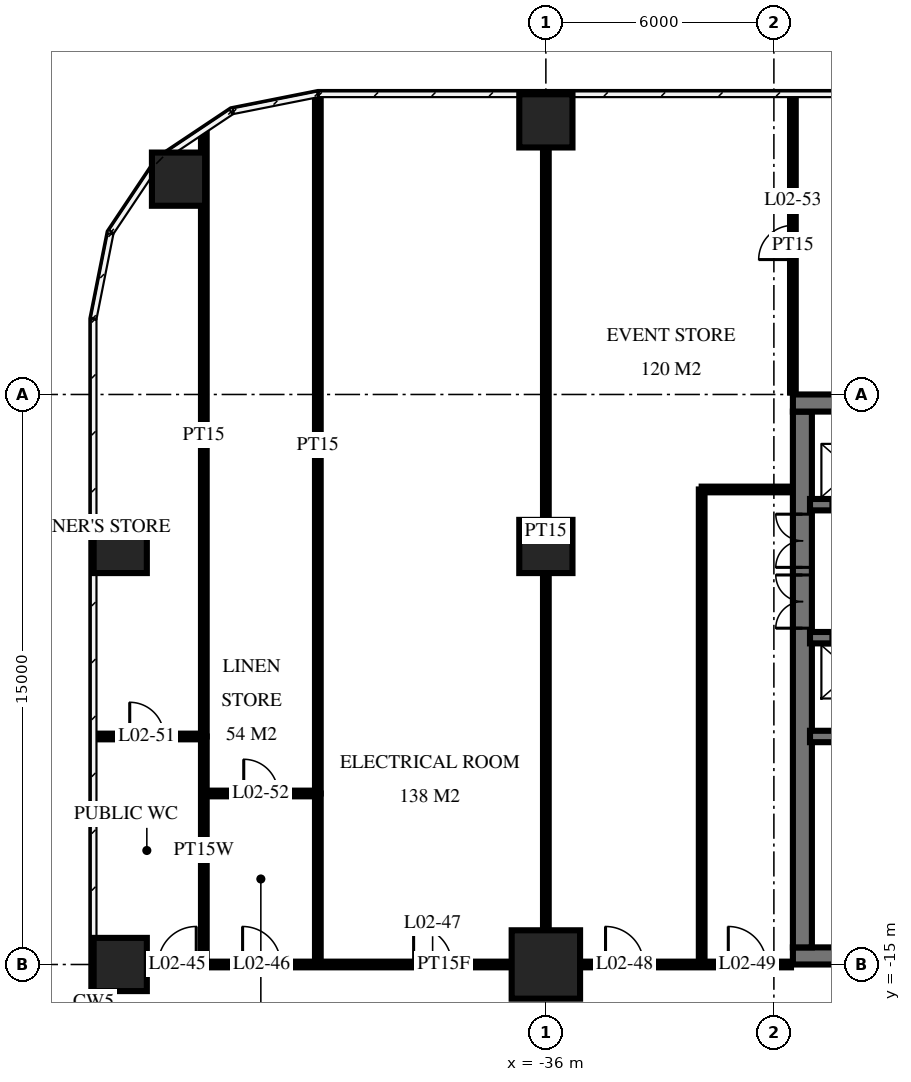
"""IFC4 building model, lengths in metres.
Left out: names, types, materials, properties, quantities, classifications, styles, units other than length and angle.
Written with IfcOpenShell. Run it as: python <this file> out.ifc"""

import sys

from ifc_helpers import new_model, si_unit, direction, frame, frame_2d, origin, origin_2d, place, context, subcontext, project, spatial, rectangle, circle, extrude, element, fill, save


model = new_model("IFC4")
c1 = context("Model", 3, precision=1e-05, world=origin(), true_north=direction((0.0, 1.0)))
c2 = subcontext(c1, "Body", "Model", "MODEL_VIEW")
j1 = project(units=[si_unit("LENGTHUNIT", "METRE"), si_unit("PLANEANGLEUNIT", "RADIAN")], contexts=[c1])
p1 = place(None, origin())
s1 = spatial("IfcSite", under=j1, at=p1, CompositionType="ELEMENT")
p2 = place(p1, origin())
s2 = spatial("IfcBuilding", under=s1, at=p2, CompositionType="ELEMENT")
p3 = place(p2, frame((0.0, 0.0, 12.5)))
s3 = spatial("IfcBuildingStorey", under=s2, at=p3, CompositionType="ELEMENT", Elevation=12.5)
for number, where, z_axis, x_axis in (
    (1, (-47.2, -15.0, 0.0), (0.0, 0.0, 1.0), (1.0, 0.0, 0.0)),
    (2, (-47.2, -4.0, 0.0), (0.0, 0.0, 1.0), (1.0, 0.0, 0.0)),
    (3, (-45.666, 5.666, 0.0), (0.0, 0.0, 1.0), (1.0, 0.0, 0.0)),
):
    element("IfcColumn", number, at=place(p3, frame(where, z_axis=z_axis, x_axis=x_axis)), inside=s3, PredefinedType="COLUMN", context=c2, shape_type="SweptSolid", body=[
        extrude(circle(Radius=0.7, at=origin_2d()), origin(), (0.0, 0.0, 1.0), 5.5),
    ])
p4 = place(p3, frame((-36.0, -15.0, 0.0), z_axis=(0.0, 0.0, 1.0), x_axis=(1.0, 0.0, 0.0)))
e4 = element("IfcColumn", 4, at=p4, inside=s3, PredefinedType="COLUMN", context=c2, shape_type="SweptSolid", body=[
    extrude(circle(Radius=0.9, at=origin_2d()), origin(), (0.0, 0.0, 1.0), 5.5),
])
for number, where, z_axis, x_axis in (
    (5, (-36.0, -4.0, 0.0), (0.0, 0.0, 1.0), (1.0, 0.0, 0.0)),
    (6, (-36.0, 7.2, 0.0), (0.0, 0.0, 1.0), (1.0, 0.0, 0.0)),
):
    element("IfcColumn", number, at=place(p3, frame(where, z_axis=z_axis, x_axis=x_axis)), inside=s3, PredefinedType="COLUMN", context=c2, shape_type="SweptSolid", body=[
        extrude(circle(Radius=0.7, at=origin_2d()), origin(), (0.0, 0.0, 1.0), 5.5),
    ])
p5 = place(p3, frame((-29.5, -0.225, 0.0), z_axis=(0.0, 0.0, 1.0), x_axis=(1.0, 0.0, 0.0)))
e7 = element("IfcWall", 7, at=p5, inside=s3, PredefinedType="SHEAR", context=c2, shape_type="SweptSolid", body=[
    extrude(rectangle(XDim=19.5, YDim=0.45, at=frame_2d((9.75, 0.0))), origin(), (0.0, 0.0, 1.0), 5.5),
])
p6 = place(p3, frame((-29.5, -14.775, 0.0), z_axis=(0.0, 0.0, 1.0), x_axis=(1.0, 0.0, 0.0)))
e8 = element("IfcWall", 8, at=p6, inside=s3, PredefinedType="SHEAR", context=c2, shape_type="SweptSolid", body=[
    extrude(rectangle(XDim=19.5, YDim=0.45, at=frame_2d((9.75, 0.0))), origin(), (0.0, 0.0, 1.0), 5.5),
])
p7 = place(p6, frame((11.2, 0.0, 0.0)))
e9 = element("IfcOpeningElement", 9, at=p7, cuts=e8, PredefinedType="OPENING", context=c2, shape_type="SweptSolid", body=[
    extrude(rectangle(XDim=1.2, YDim=2.1, at=frame_2d((0.6, 1.05))), frame((0.0, 0.235, 0.0), z_axis=(0.0, -1.0, 0.0), x_axis=(1.0, 0.0, 0.0)), (0.0, 0.0, 1.0), 0.47),
])
p8 = place(p6, frame((14.25, 0.0, 0.0)))
e10 = element("IfcOpeningElement", 10, at=p8, cuts=e8, PredefinedType="OPENING", context=c2, shape_type="SweptSolid", body=[
    extrude(rectangle(XDim=1.1, YDim=2.1, at=frame_2d((0.55, 1.05))), frame((0.0, 0.235, 0.0), z_axis=(0.0, -1.0, 0.0), x_axis=(1.0, 0.0, 0.0)), (0.0, 0.0, 1.0), 0.47),
])
p9 = place(p6, frame((8.5, 0.0, 0.0)))
e11 = element("IfcOpeningElement", 11, at=p9, cuts=e8, PredefinedType="OPENING", context=c2, shape_type="SweptSolid", body=[
    extrude(rectangle(XDim=0.9, YDim=2.1, at=frame_2d((0.45, 1.05))), frame((0.0, 0.235, 0.0), z_axis=(0.0, -1.0, 0.0), x_axis=(1.0, 0.0, 0.0)), (0.0, 0.0, 1.0), 0.47),
])
p10 = place(p6, frame((6.05, 0.0, 0.0)))
e12 = element("IfcOpeningElement", 12, at=p10, cuts=e8, PredefinedType="OPENING", context=c2, shape_type="SweptSolid", body=[
    extrude(rectangle(XDim=1.0, YDim=2.1, at=frame_2d((0.5, 1.05))), frame((0.0, 0.235, 0.0), z_axis=(0.0, -1.0, 0.0), x_axis=(1.0, 0.0, 0.0)), (0.0, 0.0, 1.0), 0.47),
])
p11 = place(p6, frame((3.413, 0.0, 0.0)))
e13 = element("IfcOpeningElement", 13, at=p11, cuts=e8, PredefinedType="OPENING", context=c2, shape_type="SweptSolid", body=[
    extrude(rectangle(XDim=1.0, YDim=2.1, at=frame_2d((0.5, 1.05))), frame((0.0, 0.235, 0.0), z_axis=(0.0, -1.0, 0.0), x_axis=(1.0, 0.0, 0.0)), (0.0, 0.0, 1.0), 0.47),
])
p12 = place(p6, frame((1.087, 0.0, 0.0)))
e14 = element("IfcOpeningElement", 14, at=p12, cuts=e8, PredefinedType="OPENING", context=c2, shape_type="SweptSolid", body=[
    extrude(rectangle(XDim=1.0, YDim=2.1, at=frame_2d((0.5, 1.05))), frame((0.0, 0.235, 0.0), z_axis=(0.0, -1.0, 0.0), x_axis=(1.0, 0.0, 0.0)), (0.0, 0.0, 1.0), 0.47),
])
p13 = place(p3, frame((-29.25, -14.55, 0.0), z_axis=(0.0, 0.0, 1.0), x_axis=(0.0, 1.0, 0.0)))
e15 = element("IfcWall", 15, at=p13, inside=s3, PredefinedType="SHEAR", context=c2, shape_type="SweptSolid", body=[
    extrude(rectangle(XDim=14.1, YDim=0.5, at=frame_2d((7.05, 0.0))), origin(), (0.0, 0.0, 1.0), 5.5),
])
p14 = place(p13, frame((8.4, 0.0, 0.0)))
e16 = element("IfcOpeningElement", 16, at=p14, cuts=e15, PredefinedType="OPENING", context=c2, shape_type="SweptSolid", body=[
    extrude(rectangle(XDim=1.4, YDim=2.4, at=frame_2d((0.7, 1.2))), frame((0.0, 0.26, 0.0), z_axis=(0.0, -1.0, 0.0), x_axis=(1.0, 0.0, 0.0)), (0.0, 0.0, 1.0), 0.52),
])
p15 = place(p13, frame((10.0, 0.0, 0.0)))
e17 = element("IfcOpeningElement", 17, at=p15, cuts=e15, PredefinedType="OPENING", context=c2, shape_type="SweptSolid", body=[
    extrude(rectangle(XDim=1.4, YDim=2.4, at=frame_2d((0.7, 1.2))), frame((0.0, 0.26, 0.0), z_axis=(0.0, -1.0, 0.0), x_axis=(1.0, 0.0, 0.0)), (0.0, 0.0, 1.0), 0.52),
])
p16 = place(p3, frame((-29.05, -2.9, 0.0), z_axis=(0.0, 0.0, 1.0), x_axis=(1.0, 0.0, 0.0)))
e18 = element("IfcWall", 18, at=p16, inside=s3, PredefinedType="SHEAR", context=c2, shape_type="SweptSolid", body=[
    extrude(rectangle(XDim=18.7, YDim=0.3, at=frame_2d((9.35, 0.0))), origin(), (0.0, 0.0, 1.0), 5.5),
])
p17 = place(p16, frame((2.95, 0.0, 0.0)))
e19 = element("IfcOpeningElement", 19, at=p17, cuts=e18, PredefinedType="OPENING", context=c2, shape_type="SweptSolid", body=[
    extrude(rectangle(XDim=1.1, YDim=2.1, at=frame_2d((0.55, 1.05))), frame((0.0, 0.16, 0.0), z_axis=(0.0, -1.0, 0.0), x_axis=(1.0, 0.0, 0.0)), (0.0, 0.0, 1.0), 0.32),
])
p18 = place(p16, frame((0.55, 0.0, 0.0)))
e20 = element("IfcOpeningElement", 20, at=p18, cuts=e18, PredefinedType="OPENING", context=c2, shape_type="SweptSolid", body=[
    extrude(rectangle(XDim=1.1, YDim=2.1, at=frame_2d((0.55, 1.05))), frame((0.0, 0.16, 0.0), z_axis=(0.0, -1.0, 0.0), x_axis=(1.0, 0.0, 0.0)), (0.0, 0.0, 1.0), 0.32),
])
p19 = place(p16, frame((10.9, 0.0, 0.0)))
e21 = element("IfcOpeningElement", 21, at=p19, cuts=e18, PredefinedType="OPENING", context=c2, shape_type="SweptSolid", body=[
    extrude(rectangle(XDim=0.9, YDim=2.1, at=frame_2d((0.45, 1.05))), frame((0.0, 0.16, 0.0), z_axis=(0.0, -1.0, 0.0), x_axis=(1.0, 0.0, 0.0)), (0.0, 0.0, 1.0), 0.32),
])
p20 = place(p16, frame((16.85, 0.0, 0.0)))
e22 = element("IfcOpeningElement", 22, at=p20, cuts=e18, PredefinedType="OPENING", context=c2, shape_type="SweptSolid", body=[
    extrude(rectangle(XDim=1.0, YDim=2.1, at=frame_2d((0.5, 1.05))), frame((0.0, 0.16, 0.0), z_axis=(0.0, -1.0, 0.0), x_axis=(1.0, 0.0, 0.0)), (0.0, 0.0, 1.0), 0.32),
])
p21 = place(p16, frame((13.85, 0.0, 0.0)))
e23 = element("IfcOpeningElement", 23, at=p21, cuts=e18, PredefinedType="OPENING", context=c2, shape_type="SweptSolid", body=[
    extrude(rectangle(XDim=1.0, YDim=2.1, at=frame_2d((0.5, 1.05))), frame((0.0, 0.16, 0.0), z_axis=(0.0, -1.0, 0.0), x_axis=(1.0, 0.0, 0.0)), (0.0, 0.0, 1.0), 0.32),
])
p22 = place(p16, frame((5.6, 0.0, 0.0)))
e24 = element("IfcOpeningElement", 24, at=p22, cuts=e18, PredefinedType="OPENING", context=c2, shape_type="SweptSolid", body=[
    extrude(rectangle(XDim=1.0, YDim=2.1, at=frame_2d((0.5, 1.05))), frame((0.0, 0.16, 0.0), z_axis=(0.0, -1.0, 0.0), x_axis=(1.0, 0.0, 0.0)), (0.0, 0.0, 1.0), 0.32),
])
p23 = place(p3, frame((-29.05, -6.4, 0.0), z_axis=(0.0, 0.0, 1.0), x_axis=(1.0, 0.0, 0.0)))
e25 = element("IfcWall", 25, at=p23, inside=s3, PredefinedType="SHEAR", context=c2, shape_type="SweptSolid", body=[
    extrude(rectangle(XDim=18.7, YDim=0.3, at=frame_2d((9.35, 0.0))), origin(), (0.0, 0.0, 1.0), 5.5),
])
p24 = place(p23, frame((2.95, 0.0, 0.0)))
e26 = element("IfcOpeningElement", 26, at=p24, cuts=e25, PredefinedType="OPENING", context=c2, shape_type="SweptSolid", body=[
    extrude(rectangle(XDim=1.1, YDim=2.1, at=frame_2d((0.55, 1.05))), frame((0.0, 0.16, 0.0), z_axis=(0.0, -1.0, 0.0), x_axis=(1.0, 0.0, 0.0)), (0.0, 0.0, 1.0), 0.32),
])
p25 = place(p23, frame((0.55, 0.0, 0.0)))
e27 = element("IfcOpeningElement", 27, at=p25, cuts=e25, PredefinedType="OPENING", context=c2, shape_type="SweptSolid", body=[
    extrude(rectangle(XDim=1.1, YDim=2.1, at=frame_2d((0.55, 1.05))), frame((0.0, 0.16, 0.0), z_axis=(0.0, -1.0, 0.0), x_axis=(1.0, 0.0, 0.0)), (0.0, 0.0, 1.0), 0.32),
])
p26 = place(p23, frame((10.8, 0.0, 0.0)))
e28 = element("IfcOpeningElement", 28, at=p26, cuts=e25, PredefinedType="OPENING", context=c2, shape_type="SweptSolid", body=[
    extrude(rectangle(XDim=1.1, YDim=2.1, at=frame_2d((0.55, 1.05))), frame((0.0, 0.16, 0.0), z_axis=(0.0, -1.0, 0.0), x_axis=(1.0, 0.0, 0.0)), (0.0, 0.0, 1.0), 0.32),
])
p27 = place(p23, frame((5.6, 0.0, 0.0)))
e29 = element("IfcOpeningElement", 29, at=p27, cuts=e25, PredefinedType="OPENING", context=c2, shape_type="SweptSolid", body=[
    extrude(rectangle(XDim=1.0, YDim=2.1, at=frame_2d((0.5, 1.05))), frame((0.0, 0.16, 0.0), z_axis=(0.0, -1.0, 0.0), x_axis=(1.0, 0.0, 0.0)), (0.0, 0.0, 1.0), 0.32),
])
p28 = place(p3, frame((-29.05, -9.0, 0.0), z_axis=(0.0, 0.0, 1.0), x_axis=(1.0, 0.0, 0.0)))
e30 = element("IfcWall", 30, at=p28, inside=s3, PredefinedType="SHEAR", context=c2, shape_type="SweptSolid", body=[
    extrude(rectangle(XDim=18.7, YDim=0.3, at=frame_2d((9.35, 0.0))), origin(), (0.0, 0.0, 1.0), 5.5),
])
p29 = place(p28, frame((13.8, 0.0, 0.0)))
e31 = element("IfcOpeningElement", 31, at=p29, cuts=e30, PredefinedType="OPENING", context=c2, shape_type="SweptSolid", body=[
    extrude(rectangle(XDim=1.1, YDim=2.1, at=frame_2d((0.55, 1.05))), frame((0.0, 0.16, 0.0), z_axis=(0.0, -1.0, 0.0), x_axis=(1.0, 0.0, 0.0)), (0.0, 0.0, 1.0), 0.32),
])
p30 = place(p3, frame((-29.5, 0.05, 0.0), z_axis=(0.0, 0.0, 1.0), x_axis=(0.0, 1.0, 0.0)))
e32 = element("IfcWall", 32, at=p30, inside=s3, PredefinedType="PARTITIONING", context=c2, shape_type="SweptSolid", body=[
    extrude(rectangle(XDim=7.77, YDim=0.15, at=frame_2d((3.885, 0.0))), origin(), (0.0, 0.0, 1.0), 5.05),
])
p31 = place(p30, frame((3.5, 0.0, 0.0)))
e33 = element("IfcOpeningElement", 33, at=p31, cuts=e32, PredefinedType="OPENING", context=c2, shape_type="SweptSolid", body=[
    extrude(rectangle(XDim=0.9, YDim=2.1, at=frame_2d((0.45, 1.05))), frame((0.0, 0.085, 0.0), z_axis=(0.0, -1.0, 0.0), x_axis=(1.0, 0.0, 0.0)), (0.0, 0.0, 1.0), 0.17),
])
p32 = place(p3, frame((-31.9, -15.0, 0.0), z_axis=(0.0, 0.0, 1.0), x_axis=(0.0, 1.0, 0.0)))
e34 = element("IfcWall", 34, at=p32, inside=s3, PredefinedType="PARTITIONING", context=c2, shape_type="SweptSolid", body=[
    extrude(rectangle(XDim=12.5, YDim=0.15, at=frame_2d((6.25, 0.0))), origin(), (0.0, 0.0, 1.0), 5.05),
])
p33 = place(p3, frame((-36.0, -15.0, 0.0), z_axis=(0.0, 0.0, 1.0), x_axis=(0.0, 1.0, 0.0)))
e35 = element("IfcWall", 35, at=p33, inside=s3, PredefinedType="PARTITIONING", context=c2, shape_type="SweptSolid", body=[
    extrude(rectangle(XDim=22.82, YDim=0.15, at=frame_2d((11.41, 0.0))), origin(), (0.0, 0.0, 1.0), 5.05),
])
p34 = place(p3, frame((-42.0, -10.5, 0.0), z_axis=(0.0, 0.0, 1.0), x_axis=(0.0, 1.0, 0.0)))
e36 = element("IfcWall", 36, at=p34, inside=s3, PredefinedType="PARTITIONING", context=c2, shape_type="SweptSolid", body=[
    extrude(rectangle(XDim=18.316, YDim=0.15, at=frame_2d((9.158, 0.0))), origin(), (0.0, 0.0, 1.0), 5.05),
])
p35 = place(p3, frame((-42.0, -15.0, 0.0), z_axis=(0.0, 0.0, 1.0), x_axis=(0.0, 1.0, 0.0)))
e37 = element("IfcWall", 37, at=p35, inside=s3, PredefinedType="PLUMBINGWALL", context=c2, shape_type="SweptSolid", body=[
    extrude(rectangle(XDim=4.5, YDim=0.15, at=frame_2d((2.25, 0.0))), origin(), (0.0, 0.0, 1.0), 5.05),
])
p36 = place(p3, frame((-45.0, -9.0, 0.0), z_axis=(0.0, 0.0, 1.0), x_axis=(0.0, 1.0, 0.0)))
e38 = element("IfcWall", 38, at=p36, inside=s3, PredefinedType="PARTITIONING", context=c2, shape_type="SweptSolid", body=[
    extrude(rectangle(XDim=15.856, YDim=0.15, at=frame_2d((7.928, 0.0))), origin(), (0.0, 0.0, 1.0), 5.05),
])
p37 = place(p3, frame((-45.0, -15.0, 0.0), z_axis=(0.0, 0.0, 1.0), x_axis=(0.0, 1.0, 0.0)))
e39 = element("IfcWall", 39, at=p37, inside=s3, PredefinedType="PLUMBINGWALL", context=c2, shape_type="SweptSolid", body=[
    extrude(rectangle(XDim=6.0, YDim=0.15, at=frame_2d((3.0, 0.0))), origin(), (0.0, 0.0, 1.0), 5.05),
])
p38 = place(p3, frame((-47.82, -15.0, 0.0), z_axis=(0.0, 0.0, 1.0), x_axis=(1.0, 0.0, 0.0)))
e40 = element("IfcWall", 40, at=p38, inside=s3, PredefinedType="PARTITIONING", context=c2, shape_type="SweptSolid", body=[
    extrude(rectangle(XDim=18.27, YDim=0.15, at=frame_2d((9.135, 0.0))), origin(), (0.0, 0.0, 1.0), 5.05),
])
p39 = place(p38, frame((1.62, 0.0, 0.0)))
e41 = element("IfcOpeningElement", 41, at=p39, cuts=e40, PredefinedType="OPENING", context=c2, shape_type="SweptSolid", body=[
    extrude(rectangle(XDim=1.0, YDim=2.1, at=frame_2d((0.5, 1.05))), frame((0.0, 0.085, 0.0), z_axis=(0.0, -1.0, 0.0), x_axis=(1.0, 0.0, 0.0)), (0.0, 0.0, 1.0), 0.17),
])
p40 = place(p38, frame((3.84, 0.0, 0.0)))
e42 = element("IfcOpeningElement", 42, at=p40, cuts=e40, PredefinedType="OPENING", context=c2, shape_type="SweptSolid", body=[
    extrude(rectangle(XDim=1.0, YDim=2.1, at=frame_2d((0.5, 1.05))), frame((0.0, 0.085, 0.0), z_axis=(0.0, -1.0, 0.0), x_axis=(1.0, 0.0, 0.0)), (0.0, 0.0, 1.0), 0.17),
])
p41 = place(p38, frame((8.34, 0.0, 0.0)))
e43 = element("IfcOpeningElement", 43, at=p41, cuts=e40, PredefinedType="OPENING", context=c2, shape_type="SweptSolid", body=[
    extrude(rectangle(XDim=1.0, YDim=2.1, at=frame_2d((0.5, 1.05))), frame((0.0, 0.085, 0.0), z_axis=(0.0, -1.0, 0.0), x_axis=(1.0, 0.0, 0.0)), (0.0, 0.0, 1.0), 0.17),
])
p42 = place(p38, frame((13.39, 0.0, 0.0)))
e44 = element("IfcOpeningElement", 44, at=p42, cuts=e40, PredefinedType="OPENING", context=c2, shape_type="SweptSolid", body=[
    extrude(rectangle(XDim=1.0, YDim=2.1, at=frame_2d((0.5, 1.05))), frame((0.0, 0.085, 0.0), z_axis=(0.0, -1.0, 0.0), x_axis=(1.0, 0.0, 0.0)), (0.0, 0.0, 1.0), 0.17),
])
p43 = place(p38, frame((16.62, 0.0, 0.0)))
e45 = element("IfcOpeningElement", 45, at=p43, cuts=e40, PredefinedType="OPENING", context=c2, shape_type="SweptSolid", body=[
    extrude(rectangle(XDim=1.0, YDim=2.1, at=frame_2d((0.5, 1.05))), frame((0.0, 0.085, 0.0), z_axis=(0.0, -1.0, 0.0), x_axis=(1.0, 0.0, 0.0)), (0.0, 0.0, 1.0), 0.17),
])
p44 = place(p3, frame((-45.0, -10.5, 0.0), z_axis=(0.0, 0.0, 1.0), x_axis=(1.0, 0.0, 0.0)))
e46 = element("IfcWall", 46, at=p44, inside=s3, PredefinedType="PLUMBINGWALL", context=c2, shape_type="SweptSolid", body=[
    extrude(rectangle(XDim=3.0, YDim=0.15, at=frame_2d((1.5, 0.0))), origin(), (0.0, 0.0, 1.0), 5.05),
])
p45 = place(p44, frame((1.05, 0.0, 0.0)))
e47 = element("IfcOpeningElement", 47, at=p45, cuts=e46, PredefinedType="OPENING", context=c2, shape_type="SweptSolid", body=[
    extrude(rectangle(XDim=0.9, YDim=2.1, at=frame_2d((0.45, 1.05))), frame((0.0, 0.085, 0.0), z_axis=(0.0, -1.0, 0.0), x_axis=(1.0, 0.0, 0.0)), (0.0, 0.0, 1.0), 0.17),
])
p46 = place(p3, frame((-47.82, -9.0, 0.0), z_axis=(0.0, 0.0, 1.0), x_axis=(1.0, 0.0, 0.0)))
e48 = element("IfcWall", 48, at=p46, inside=s3, PredefinedType="PLUMBINGWALL", context=c2, shape_type="SweptSolid", body=[
    extrude(rectangle(XDim=2.82, YDim=0.15, at=frame_2d((1.41, 0.0))), origin(), (0.0, 0.0, 1.0), 5.05),
])
p47 = place(p46, frame((0.87, 0.0, 0.0)))
e49 = element("IfcOpeningElement", 49, at=p47, cuts=e48, PredefinedType="OPENING", context=c2, shape_type="SweptSolid", body=[
    extrude(rectangle(XDim=0.9, YDim=2.1, at=frame_2d((0.45, 1.05))), frame((0.0, 0.085, 0.0), z_axis=(0.0, -1.0, 0.0), x_axis=(1.0, 0.0, 0.0)), (0.0, 0.0, 1.0), 0.17),
])
p48 = place(p3, frame((-31.9, -2.5, 0.0), z_axis=(0.0, 0.0, 1.0), x_axis=(1.0, 0.0, 0.0)))
e50 = element("IfcWall", 50, at=p48, inside=s3, PredefinedType="PARTITIONING", context=c2, shape_type="SweptSolid", body=[
    extrude(rectangle(XDim=2.35, YDim=0.15, at=frame_2d((1.175, 0.0))), origin(), (0.0, 0.0, 1.0), 5.05),
])
p49 = place(p14, origin())
e51 = element("IfcDoor", 51, at=p49, inside=s3, OperationType="DOUBLE_DOOR_SINGLE_SWING", PredefinedType="DOOR", context=c2, shape_type="SweptSolid", body=[
    extrude(rectangle(XDim=1.4, YDim=2.4, at=frame_2d((0.7, 1.2))), frame((0.0, 0.025, 0.0), z_axis=(0.0, -1.0, 0.0), x_axis=(1.0, 0.0, 0.0)), (0.0, 0.0, 1.0), 0.05),
])
fill(e16, e51)
p50 = place(p15, origin())
e52 = element("IfcDoor", 52, at=p50, inside=s3, OperationType="DOUBLE_DOOR_SINGLE_SWING", PredefinedType="DOOR", context=c2, shape_type="SweptSolid", body=[
    extrude(rectangle(XDim=1.4, YDim=2.4, at=frame_2d((0.7, 1.2))), frame((0.0, 0.025, 0.0), z_axis=(0.0, -1.0, 0.0), x_axis=(1.0, 0.0, 0.0)), (0.0, 0.0, 1.0), 0.05),
])
fill(e17, e52)
p51 = place(p39, origin())
e53 = element("IfcDoor", 53, at=p51, inside=s3, OperationType="SINGLE_SWING_LEFT", PredefinedType="DOOR", context=c2, shape_type="SweptSolid", body=[
    extrude(rectangle(XDim=1.0, YDim=2.1, at=frame_2d((0.5, 1.05))), frame((0.0, 0.025, 0.0), z_axis=(0.0, -1.0, 0.0), x_axis=(1.0, 0.0, 0.0)), (0.0, 0.0, 1.0), 0.05),
])
fill(e41, e53)
p52 = place(p40, origin())
e54 = element("IfcDoor", 54, at=p52, inside=s3, OperationType="SINGLE_SWING_RIGHT", PredefinedType="DOOR", context=c2, shape_type="SweptSolid", body=[
    extrude(rectangle(XDim=1.0, YDim=2.1, at=frame_2d((0.5, 1.05))), frame((0.0, 0.025, 0.0), z_axis=(0.0, -1.0, 0.0), x_axis=(1.0, 0.0, 0.0)), (0.0, 0.0, 1.0), 0.05),
])
fill(e42, e54)
p53 = place(p41, origin())
e55 = element("IfcDoor", 55, at=p53, inside=s3, OperationType="SINGLE_SWING_RIGHT", PredefinedType="DOOR", context=c2, shape_type="SweptSolid", body=[
    extrude(rectangle(XDim=1.0, YDim=2.1, at=frame_2d((0.5, 1.05))), frame((0.0, 0.025, 0.0), z_axis=(0.0, -1.0, 0.0), x_axis=(1.0, 0.0, 0.0)), (0.0, 0.0, 1.0), 0.05),
])
fill(e43, e55)
p54 = place(p42, origin())
e56 = element("IfcDoor", 56, at=p54, inside=s3, OperationType="SINGLE_SWING_RIGHT", PredefinedType="DOOR", context=c2, shape_type="SweptSolid", body=[
    extrude(rectangle(XDim=1.0, YDim=2.1, at=frame_2d((0.5, 1.05))), frame((0.0, 0.025, 0.0), z_axis=(0.0, -1.0, 0.0), x_axis=(1.0, 0.0, 0.0)), (0.0, 0.0, 1.0), 0.05),
])
fill(e44, e56)
p55 = place(p43, origin())
e57 = element("IfcDoor", 57, at=p55, inside=s3, OperationType="SINGLE_SWING_RIGHT", PredefinedType="DOOR", context=c2, shape_type="SweptSolid", body=[
    extrude(rectangle(XDim=1.0, YDim=2.1, at=frame_2d((0.5, 1.05))), frame((0.0, 0.025, 0.0), z_axis=(0.0, -1.0, 0.0), x_axis=(1.0, 0.0, 0.0)), (0.0, 0.0, 1.0), 0.05),
])
fill(e45, e57)
p56 = place(p47, origin())
e58 = element("IfcDoor", 58, at=p56, inside=s3, OperationType="SINGLE_SWING_RIGHT", PredefinedType="DOOR", context=c2, shape_type="SweptSolid", body=[
    extrude(rectangle(XDim=0.9, YDim=2.1, at=frame_2d((0.45, 1.05))), frame((0.0, 0.025, 0.0), z_axis=(0.0, -1.0, 0.0), x_axis=(1.0, 0.0, 0.0)), (0.0, 0.0, 1.0), 0.05),
])
fill(e49, e58)
p57 = place(p45, origin())
e59 = element("IfcDoor", 59, at=p57, inside=s3, OperationType="SINGLE_SWING_RIGHT", PredefinedType="DOOR", context=c2, shape_type="SweptSolid", body=[
    extrude(rectangle(XDim=0.9, YDim=2.1, at=frame_2d((0.45, 1.05))), frame((0.0, 0.025, 0.0), z_axis=(0.0, -1.0, 0.0), x_axis=(1.0, 0.0, 0.0)), (0.0, 0.0, 1.0), 0.05),
])
fill(e47, e59)
p58 = place(p31, origin())
e60 = element("IfcDoor", 60, at=p58, inside=s3, OperationType="SINGLE_SWING_RIGHT", PredefinedType="DOOR", context=c2, shape_type="SweptSolid", body=[
    extrude(rectangle(XDim=0.9, YDim=2.1, at=frame_2d((0.45, 1.05))), frame((0.0, 0.025, 0.0), z_axis=(0.0, -1.0, 0.0), x_axis=(1.0, 0.0, 0.0)), (0.0, 0.0, 1.0), 0.05),
])
fill(e33, e60)
save(model, sys.argv[1])
